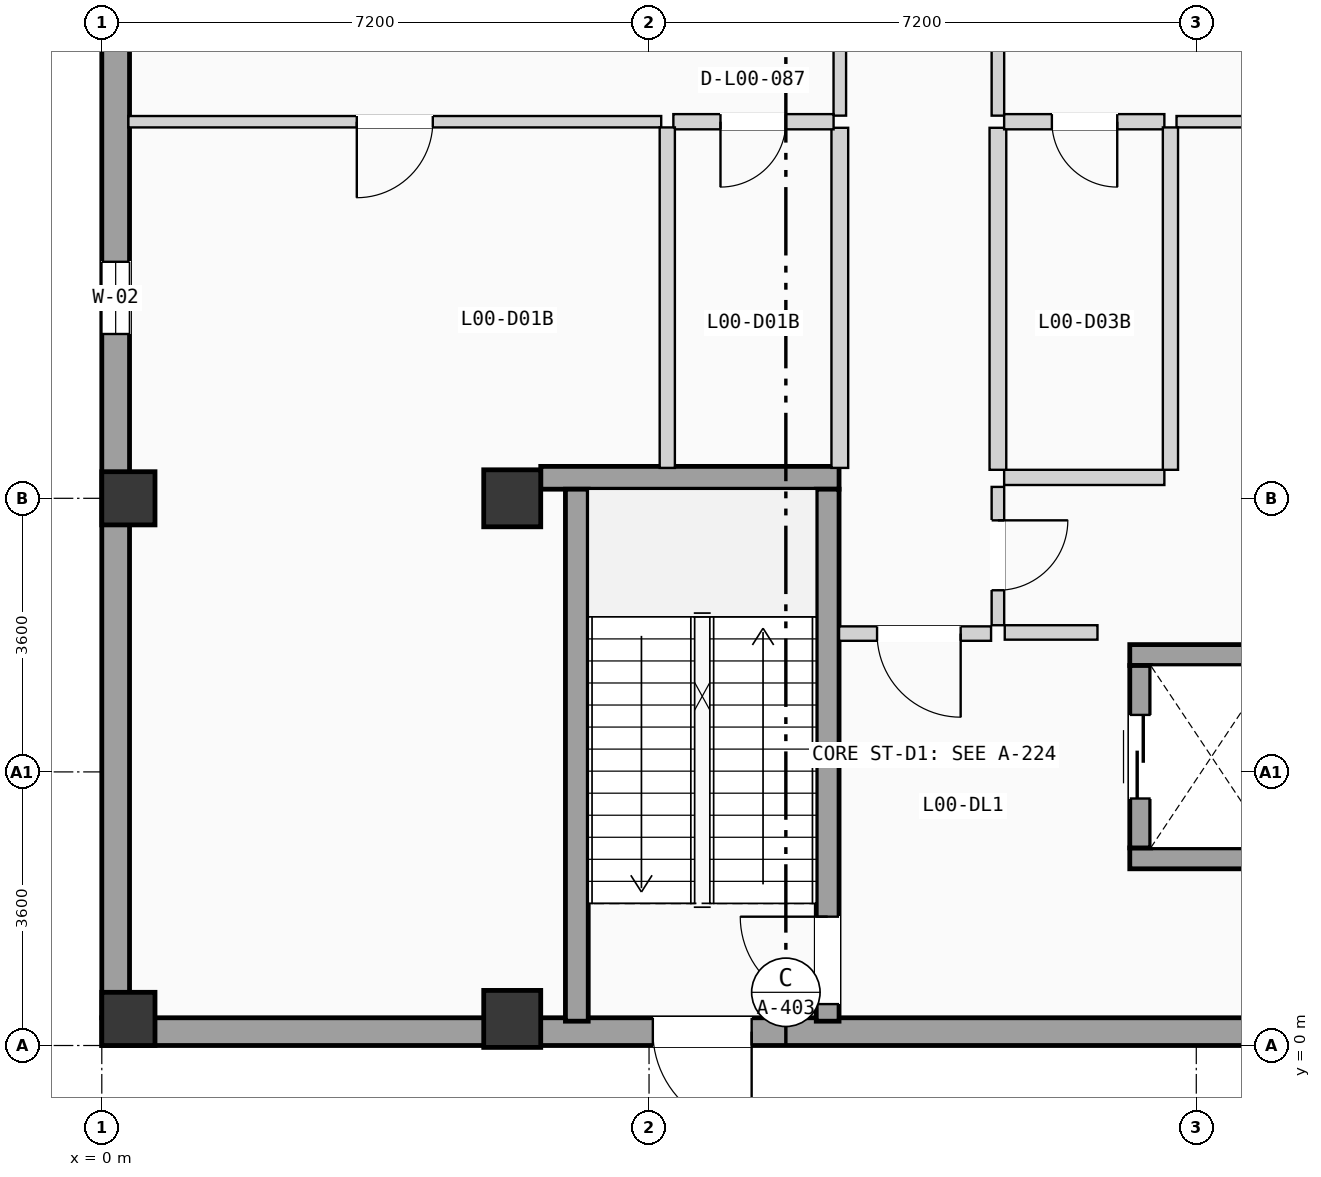
"""IFC4 building model, lengths in metres.
Left out: names, types, materials, properties, quantities, classifications, styles, units other than length and angle.
Written with IfcOpenShell. Run it as: python <this file> out.ifc"""

import sys

from ifc_helpers import new_model, si_unit, direction, frame, frame_2d, origin, origin_2d, place, context, subcontext, project, spatial, rectangle, extrude, element, fill, save


model = new_model("IFC4")
c1 = context("Model", 3, precision=1e-05, world=origin(), true_north=direction((0.0, 1.0)))
c2 = subcontext(c1, "Body", "Model", "MODEL_VIEW")
j1 = project(units=[si_unit("LENGTHUNIT", "METRE"), si_unit("PLANEANGLEUNIT", "RADIAN")], contexts=[c1])
p1 = place(None, origin())
s1 = spatial("IfcSite", under=j1, at=p1, CompositionType="ELEMENT")
p2 = place(p1, origin())
s2 = spatial("IfcBuilding", under=s1, at=p2, CompositionType="ELEMENT")
p3 = place(p2, origin())
s3 = spatial("IfcBuildingStorey", under=s2, at=p3, CompositionType="ELEMENT", Elevation=0.0)
for number, where, z_axis, x_axis in (
    (1, (0.35, 0.35, 0.0), (0.0, 0.0, 1.0), (1.0, 0.0, 0.0)),
    (2, (0.35, 7.2, 0.0), (0.0, 0.0, 1.0), (1.0, 0.0, 0.0)),
):
    element("IfcColumn", number, at=place(p3, frame(where, z_axis=z_axis, x_axis=x_axis)), inside=s3, PredefinedType="COLUMN", context=c2, shape_type="SweptSolid", body=[
        extrude(rectangle(XDim=0.7, YDim=0.7, at=origin_2d()), origin(), (0.0, 0.0, 1.0), 4.9),
    ])
for number, where, z_axis, x_axis in (
    (3, (5.4, 0.35, 0.0), (0.0, 0.0, 1.0), (1.0, 0.0, 0.0)),
    (4, (5.4, 7.2, 0.0), (0.0, 0.0, 1.0), (1.0, 0.0, 0.0)),
):
    element("IfcColumn", number, at=place(p3, frame(where, z_axis=z_axis, x_axis=x_axis)), inside=s3, PredefinedType="COLUMN", context=c2, shape_type="SweptSolid", body=[
        extrude(rectangle(XDim=0.75, YDim=0.75, at=origin_2d()), origin(), (0.0, 0.0, 1.0), 4.9),
    ])
p4 = place(p3, frame((0.0, 0.183, 0.0), z_axis=(0.0, 0.0, 1.0), x_axis=(1.0, 0.0, 0.0)))
e5 = element("IfcWall", 5, at=p4, inside=s3, PredefinedType="SOLIDWALL", context=c2, shape_type="SweptSolid", body=[
    extrude(rectangle(XDim=21.6, YDim=0.365, at=frame_2d((10.8, 0.0))), origin(), (0.0, 0.0, 1.0), 4.64),
])
p5 = place(p4, frame((7.25, 0.0, 0.0)))
e6 = element("IfcOpeningElement", 6, at=p5, cuts=e5, PredefinedType="OPENING", context=c2, shape_type="SweptSolid", body=[
    extrude(rectangle(XDim=1.3, YDim=2.2, at=frame_2d((0.65, 1.1))), frame((0.0, 0.192, 0.0), z_axis=(0.0, -1.0, 0.0), x_axis=(1.0, 0.0, 0.0)), (0.0, 0.0, 1.0), 0.385),
])
p6 = place(p3, frame((0.183, 0.365, 0.0), z_axis=(0.0, 0.0, 1.0), x_axis=(0.0, 1.0, 0.0)))
e7 = element("IfcWall", 7, at=p6, inside=s3, PredefinedType="SOLIDWALL", context=c2, shape_type="SweptSolid", body=[
    extrude(rectangle(XDim=49.67, YDim=0.365, at=frame_2d((24.835, 0.0))), origin(), (0.0, 0.0, 1.0), 4.64),
])
p7 = place(p6, frame((15.325, 0.0, 0.9)))
e8 = element("IfcOpeningElement", 8, at=p7, cuts=e7, PredefinedType="OPENING", context=c2, shape_type="SweptSolid", body=[
    extrude(rectangle(XDim=0.95, YDim=1.2, at=frame_2d((0.475, 0.6))), frame((0.0, 0.192, 0.0), z_axis=(0.0, -1.0, 0.0), x_axis=(1.0, 0.0, 0.0)), (0.0, 0.0, 1.0), 0.385),
])
p8 = place(p6, frame((8.997, 0.0, 0.9)))
e9 = element("IfcOpeningElement", 9, at=p8, cuts=e7, PredefinedType="OPENING", context=c2, shape_type="SweptSolid", body=[
    extrude(rectangle(XDim=0.95, YDim=1.35, at=frame_2d((0.475, 0.675))), frame((0.0, 0.192, 0.0), z_axis=(0.0, -1.0, 0.0), x_axis=(1.0, 0.0, 0.0)), (0.0, 0.0, 1.0), 0.385),
])
p9 = place(p6, frame((18.735, 0.0, 0.9)))
e10 = element("IfcOpeningElement", 10, at=p9, cuts=e7, PredefinedType="OPENING", context=c2, shape_type="SweptSolid", body=[
    extrude(rectangle(XDim=0.95, YDim=1.5, at=frame_2d((0.475, 0.75))), frame((0.0, 0.192, 0.0), z_axis=(0.0, -1.0, 0.0), x_axis=(1.0, 0.0, 0.0)), (0.0, 0.0, 1.0), 0.385),
])
p10 = place(p6, frame((31.56, 0.0, 0.9)))
e11 = element("IfcOpeningElement", 11, at=p10, cuts=e7, PredefinedType="OPENING", context=c2, shape_type="SweptSolid", body=[
    extrude(rectangle(XDim=0.95, YDim=1.65, at=frame_2d((0.475, 0.825))), frame((0.0, 0.192, 0.0), z_axis=(0.0, -1.0, 0.0), x_axis=(1.0, 0.0, 0.0)), (0.0, 0.0, 1.0), 0.385),
])
p11 = place(p6, frame((24.662, 0.0, 0.9)))
e12 = element("IfcOpeningElement", 12, at=p11, cuts=e7, PredefinedType="OPENING", context=c2, shape_type="SweptSolid", body=[
    extrude(rectangle(XDim=0.95, YDim=1.8, at=frame_2d((0.475, 0.9))), frame((0.0, 0.192, 0.0), z_axis=(0.0, -1.0, 0.0), x_axis=(1.0, 0.0, 0.0)), (0.0, 0.0, 1.0), 0.385),
])
p12 = place(p6, frame((38.645, 0.0, 0.9)))
e13 = element("IfcOpeningElement", 13, at=p12, cuts=e7, PredefinedType="OPENING", context=c2, shape_type="SweptSolid", body=[
    extrude(rectangle(XDim=1.05, YDim=1.2, at=frame_2d((0.525, 0.6))), frame((0.0, 0.192, 0.0), z_axis=(0.0, -1.0, 0.0), x_axis=(1.0, 0.0, 0.0)), (0.0, 0.0, 1.0), 0.385),
])
p13 = place(p3, frame((5.775, 7.47, 0.0), z_axis=(0.0, 0.0, 1.0), x_axis=(1.0, 0.0, 0.0)))
e14 = element("IfcWall", 14, at=p13, inside=s3, PredefinedType="SHEAR", context=c2, shape_type="SweptSolid", body=[
    extrude(rectangle(XDim=3.925, YDim=0.3, at=frame_2d((1.962, 0.0))), origin(), (0.0, 0.0, 1.0), 4.64),
])
p14 = place(p3, frame((6.25, 0.32, 0.0), z_axis=(0.0, 0.0, 1.0), x_axis=(0.0, 1.0, 0.0)))
e15 = element("IfcWall", 15, at=p14, inside=s3, PredefinedType="SHEAR", context=c2, shape_type="SweptSolid", body=[
    extrude(rectangle(XDim=7.0, YDim=0.3, at=frame_2d((3.5, 0.0))), origin(), (0.0, 0.0, 1.0), 4.64),
])
p15 = place(p3, frame((9.55, 0.32, 0.0), z_axis=(0.0, 0.0, 1.0), x_axis=(0.0, 1.0, 0.0)))
e16 = element("IfcWall", 16, at=p15, inside=s3, PredefinedType="SHEAR", context=c2, shape_type="SweptSolid", body=[
    extrude(rectangle(XDim=7.0, YDim=0.3, at=frame_2d((3.5, 0.0))), origin(), (0.0, 0.0, 1.0), 4.64),
])
p16 = place(p15, frame((0.225, 0.0, 0.0)))
e17 = element("IfcOpeningElement", 17, at=p16, cuts=e16, PredefinedType="OPENING", context=c2, shape_type="SweptSolid", body=[
    extrude(rectangle(XDim=1.15, YDim=2.12, at=frame_2d((0.575, 1.06))), frame((0.0, 0.16, 0.0), z_axis=(0.0, -1.0, 0.0), x_axis=(1.0, 0.0, 0.0)), (0.0, 0.0, 1.0), 0.32),
])
for number, where, z_axis, x_axis in (
    (18, (13.525, 2.462, 0.0), (0.0, 0.0, 1.0), (1.0, 0.0, 0.0)),
    (19, (13.525, 5.137, 0.0), (0.0, 0.0, 1.0), (1.0, 0.0, 0.0)),
):
    element("IfcWall", number, at=place(p3, frame(where, z_axis=z_axis, x_axis=x_axis)), inside=s3, PredefinedType="SHEAR", context=c2, shape_type="SweptSolid", body=[
        extrude(rectangle(XDim=2.15, YDim=0.275, at=frame_2d((1.075, 0.0))), origin(), (0.0, 0.0, 1.0), 4.64),
    ])
p17 = place(p3, frame((13.663, 2.6, 0.0), z_axis=(0.0, 0.0, 1.0), x_axis=(0.0, 1.0, 0.0)))
e20 = element("IfcWall", 20, at=p17, inside=s3, PredefinedType="SHEAR", context=c2, shape_type="SweptSolid", body=[
    extrude(rectangle(XDim=2.4, YDim=0.275, at=frame_2d((1.2, 0.0))), origin(), (0.0, 0.0, 1.0), 4.64),
])
p18 = place(p17, frame((0.65, 0.0, 0.0)))
e21 = element("IfcOpeningElement", 21, at=p18, cuts=e20, PredefinedType="OPENING", context=c2, shape_type="SweptSolid", body=[
    extrude(rectangle(XDim=1.1, YDim=2.15, at=frame_2d((0.55, 1.075))), frame((0.0, 0.147, 0.0), z_axis=(0.0, -1.0, 0.0), x_axis=(1.0, 0.0, 0.0)), (0.0, 0.0, 1.0), 0.295),
])
p19 = place(p3, frame((11.88, 5.435, 0.0), z_axis=(0.0, 0.0, 1.0), x_axis=(1.0, 0.0, 0.0)))
e22 = element("IfcWall", 22, at=p19, inside=s3, PredefinedType="PARTITIONING", context=c2, shape_type="SweptSolid", body=[
    extrude(rectangle(XDim=1.22, YDim=0.19, at=frame_2d((0.61, 0.0))), origin(), (0.0, 0.0, 1.0), 3.84),
])
p20 = place(p3, frame((9.7, 5.42, 0.0), z_axis=(0.0, 0.0, 1.0), x_axis=(1.0, 0.0, 0.0)))
e23 = element("IfcWall", 23, at=p20, inside=s3, PredefinedType="PARTITIONING", context=c2, shape_type="SweptSolid", body=[
    extrude(rectangle(XDim=2.0, YDim=0.19, at=frame_2d((1.0, 0.0))), origin(), (0.0, 0.0, 1.0), 3.84),
])
p21 = place(p20, frame((0.5, 0.0, 0.0)))
e24 = element("IfcOpeningElement", 24, at=p21, cuts=e23, PredefinedType="OPENING", context=c2, shape_type="SweptSolid", body=[
    extrude(rectangle(XDim=1.1, YDim=2.12, at=frame_2d((0.55, 1.06))), frame((0.0, 0.105, 0.0), z_axis=(0.0, -1.0, 0.0), x_axis=(1.0, 0.0, 0.0)), (0.0, 0.0, 1.0), 0.21),
])
p22 = place(p3, frame((11.79, 5.53, 0.0), z_axis=(0.0, 0.0, 1.0), x_axis=(0.0, 1.0, 0.0)))
e25 = element("IfcWall", 25, at=p22, inside=s3, PredefinedType="PARTITIONING", context=c2, shape_type="SweptSolid", body=[
    extrude(rectangle(XDim=1.82, YDim=0.165, at=frame_2d((0.91, 0.0))), origin(), (0.0, 0.0, 1.0), 3.84),
])
p23 = place(p22, frame((0.46, 0.0, 0.0)))
e26 = element("IfcOpeningElement", 26, at=p23, cuts=e25, PredefinedType="OPENING", context=c2, shape_type="SweptSolid", body=[
    extrude(rectangle(XDim=0.92, YDim=2.04, at=frame_2d((0.46, 1.02))), frame((0.0, 0.093, 0.0), z_axis=(0.0, -1.0, 0.0), x_axis=(1.0, 0.0, 0.0)), (0.0, 0.0, 1.0), 0.185),
])
p24 = place(p3, frame((11.872, 7.475, 0.0), z_axis=(0.0, 0.0, 1.0), x_axis=(1.0, 0.0, 0.0)))
e27 = element("IfcWall", 27, at=p24, inside=s3, PredefinedType="PLUMBINGWALL", context=c2, shape_type="SweptSolid", body=[
    extrude(rectangle(XDim=2.108, YDim=0.2, at=frame_2d((1.054, 0.0))), origin(), (0.0, 0.0, 1.0), 3.84),
])
p25 = place(p3, frame((9.71, 12.235, 0.0), z_axis=(0.0, 0.0, 1.0), x_axis=(0.0, 1.0, 0.0)))
e28 = element("IfcWall", 28, at=p25, inside=s3, PredefinedType="PARTITIONING", context=c2, shape_type="SweptSolid", body=[
    extrude(rectangle(XDim=5.424, YDim=0.165, at=frame_2d((2.712, 0.0))), origin(), (0.0, 0.0, 1.0), 3.84),
])
p26 = place(p25, frame((2.222, 0.0, 0.0)))
e29 = element("IfcOpeningElement", 29, at=p26, cuts=e28, PredefinedType="OPENING", context=c2, shape_type="SweptSolid", body=[
    extrude(rectangle(XDim=0.98, YDim=2.08, at=frame_2d((0.49, 1.04))), frame((0.0, 0.093, 0.0), z_axis=(0.0, -1.0, 0.0), x_axis=(1.0, 0.0, 0.0)), (0.0, 0.0, 1.0), 0.185),
])
p27 = place(p3, frame((9.71, 7.6, 0.0), z_axis=(0.0, 0.0, 1.0), x_axis=(0.0, 1.0, 0.0)))
e30 = element("IfcWall", 30, at=p27, inside=s3, PredefinedType="PLUMBINGWALL", context=c2, shape_type="SweptSolid", body=[
    extrude(rectangle(XDim=4.475, YDim=0.22, at=frame_2d((2.237, 0.0))), origin(), (0.0, 0.0, 1.0), 3.84),
])
p28 = place(p3, frame((11.79, 12.235, 0.0), z_axis=(0.0, 0.0, 1.0), x_axis=(0.0, 1.0, 0.0)))
e31 = element("IfcWall", 31, at=p28, inside=s3, PredefinedType="PARTITIONING", context=c2, shape_type="SweptSolid", body=[
    extrude(rectangle(XDim=5.424, YDim=0.165, at=frame_2d((2.712, 0.0))), origin(), (0.0, 0.0, 1.0), 3.84),
])
p29 = place(p28, frame((2.222, 0.0, 0.0)))
e32 = element("IfcOpeningElement", 32, at=p29, cuts=e31, PredefinedType="OPENING", context=c2, shape_type="SweptSolid", body=[
    extrude(rectangle(XDim=0.98, YDim=2.08, at=frame_2d((0.49, 1.04))), frame((0.0, 0.093, 0.0), z_axis=(0.0, -1.0, 0.0), x_axis=(1.0, 0.0, 0.0)), (0.0, 0.0, 1.0), 0.185),
])
p30 = place(p3, frame((11.79, 7.575, 0.0), z_axis=(0.0, 0.0, 1.0), x_axis=(0.0, 1.0, 0.0)))
e33 = element("IfcWall", 33, at=p30, inside=s3, PredefinedType="PLUMBINGWALL", context=c2, shape_type="SweptSolid", body=[
    extrude(rectangle(XDim=4.5, YDim=0.22, at=frame_2d((2.25, 0.0))), origin(), (0.0, 0.0, 1.0), 3.84),
])
p31 = place(p3, frame((7.52, 12.155, 0.0), z_axis=(0.0, 0.0, 1.0), x_axis=(1.0, 0.0, 0.0)))
e34 = element("IfcWall", 34, at=p31, inside=s3, PredefinedType="PLUMBINGWALL", context=c2, shape_type="SweptSolid", body=[
    extrude(rectangle(XDim=2.108, YDim=0.2, at=frame_2d((1.054, 0.0))), origin(), (0.0, 0.0, 1.0), 3.84),
])
p32 = place(p31, frame((0.62, 0.0, 0.0)))
e35 = element("IfcOpeningElement", 35, at=p32, cuts=e34, PredefinedType="OPENING", context=c2, shape_type="SweptSolid", body=[
    extrude(rectangle(XDim=0.86, YDim=2.0, at=frame_2d((0.43, 1.0))), frame((0.0, 0.11, 0.0), z_axis=(0.0, -1.0, 0.0), x_axis=(1.0, 0.0, 0.0)), (0.0, 0.0, 1.0), 0.22),
])
p33 = place(p3, frame((0.35, 12.155, 0.0), z_axis=(0.0, 0.0, 1.0), x_axis=(1.0, 0.0, 0.0)))
e36 = element("IfcWall", 36, at=p33, inside=s3, PredefinedType="PARTITIONING", context=c2, shape_type="SweptSolid", body=[
    extrude(rectangle(XDim=7.01, YDim=0.15, at=frame_2d((3.505, 0.0))), origin(), (0.0, 0.0, 1.0), 3.84),
])
p34 = place(p33, frame((3.005, 0.0, 0.0)))
e37 = element("IfcOpeningElement", 37, at=p34, cuts=e36, PredefinedType="OPENING", context=c2, shape_type="SweptSolid", body=[
    extrude(rectangle(XDim=1.0, YDim=2.06, at=frame_2d((0.5, 1.03))), frame((0.0, 0.085, 0.0), z_axis=(0.0, -1.0, 0.0), x_axis=(1.0, 0.0, 0.0)), (0.0, 0.0, 1.0), 0.17),
])
p35 = place(p3, frame((7.44, 7.6, 0.0), z_axis=(0.0, 0.0, 1.0), x_axis=(0.0, 1.0, 0.0)))
e38 = element("IfcWall", 38, at=p35, inside=s3, PredefinedType="PLUMBINGWALL", context=c2, shape_type="SweptSolid", body=[
    extrude(rectangle(XDim=4.48, YDim=0.2, at=frame_2d((2.24, 0.0))), origin(), (0.0, 0.0, 1.0), 3.84),
])
p36 = place(p3, frame((11.872, 12.155, 0.0), z_axis=(0.0, 0.0, 1.0), x_axis=(1.0, 0.0, 0.0)))
e39 = element("IfcWall", 39, at=p36, inside=s3, PredefinedType="PLUMBINGWALL", context=c2, shape_type="SweptSolid", body=[
    extrude(rectangle(XDim=2.108, YDim=0.2, at=frame_2d((1.054, 0.0))), origin(), (0.0, 0.0, 1.0), 3.84),
])
p37 = place(p36, frame((0.628, 0.0, 0.0)))
e40 = element("IfcOpeningElement", 40, at=p37, cuts=e39, PredefinedType="OPENING", context=c2, shape_type="SweptSolid", body=[
    extrude(rectangle(XDim=0.86, YDim=2.0, at=frame_2d((0.43, 1.0))), frame((0.0, 0.11, 0.0), z_axis=(0.0, -1.0, 0.0), x_axis=(1.0, 0.0, 0.0)), (0.0, 0.0, 1.0), 0.22),
])
p38 = place(p3, frame((14.14, 12.155, 0.0), z_axis=(0.0, 0.0, 1.0), x_axis=(1.0, 0.0, 0.0)))
e41 = element("IfcWall", 41, at=p38, inside=s3, PredefinedType="PARTITIONING", context=c2, shape_type="SweptSolid", body=[
    extrude(rectangle(XDim=7.11, YDim=0.15, at=frame_2d((3.555, 0.0))), origin(), (0.0, 0.0, 1.0), 3.84),
])
p39 = place(p38, frame((3.085, 0.0, 0.0)))
e42 = element("IfcOpeningElement", 42, at=p39, cuts=e41, PredefinedType="OPENING", context=c2, shape_type="SweptSolid", body=[
    extrude(rectangle(XDim=0.94, YDim=2.06, at=frame_2d((0.47, 1.03))), frame((0.0, 0.085, 0.0), z_axis=(0.0, -1.0, 0.0), x_axis=(1.0, 0.0, 0.0)), (0.0, 0.0, 1.0), 0.17),
])
p40 = place(p3, frame((14.06, 7.575, 0.0), z_axis=(0.0, 0.0, 1.0), x_axis=(0.0, 1.0, 0.0)))
e43 = element("IfcWall", 43, at=p40, inside=s3, PredefinedType="PLUMBINGWALL", context=c2, shape_type="SweptSolid", body=[
    extrude(rectangle(XDim=4.505, YDim=0.2, at=frame_2d((2.252, 0.0))), origin(), (0.0, 0.0, 1.0), 3.84),
])
p41 = place(p5, frame((1.3, 0.0, 0.0), z_axis=(0.0, 0.0, 1.0), x_axis=(-1.0, 0.0, 0.0)))
e44 = element("IfcDoor", 44, at=p41, inside=s3, OperationType="SINGLE_SWING_RIGHT", PredefinedType="DOOR", context=c2, shape_type="SweptSolid", body=[
    extrude(rectangle(XDim=1.3, YDim=2.2, at=frame_2d((0.65, 1.1))), frame((0.0, 0.025, 0.0), z_axis=(0.0, -1.0, 0.0), x_axis=(1.0, 0.0, 0.0)), (0.0, 0.0, 1.0), 0.05),
])
fill(e6, e44)
p42 = place(p8, origin())
e45 = element("IfcWindow", 45, at=p42, inside=s3, PartitioningType="SINGLE_PANEL", PredefinedType="WINDOW", context=c2, shape_type="SweptSolid", body=[
    extrude(rectangle(XDim=0.95, YDim=1.35, at=frame_2d((0.475, 0.675))), frame((0.0, 0.03, 0.0), z_axis=(0.0, -1.0, 0.0), x_axis=(1.0, 0.0, 0.0)), (0.0, 0.0, 1.0), 0.06),
])
fill(e9, e45)
p43 = place(p16, origin())
e46 = element("IfcDoor", 46, at=p43, inside=s3, OperationType="SINGLE_SWING_RIGHT", PredefinedType="DOOR", context=c2, shape_type="SweptSolid", body=[
    extrude(rectangle(XDim=1.15, YDim=2.12, at=frame_2d((0.575, 1.06))), frame((0.0, 0.025, 0.0), z_axis=(0.0, -1.0, 0.0), x_axis=(1.0, 0.0, 0.0)), (0.0, 0.0, 1.0), 0.05),
])
fill(e17, e46)
p44 = place(p18, origin())
e47 = element("IfcDoor", 47, at=p44, inside=s3, OperationType="SLIDING_TO_LEFT", PredefinedType="DOOR", context=c2, shape_type="SweptSolid", body=[
    extrude(rectangle(XDim=1.1, YDim=2.15, at=frame_2d((0.55, 1.075))), frame((0.0, 0.025, 0.0), z_axis=(0.0, -1.0, 0.0), x_axis=(1.0, 0.0, 0.0)), (0.0, 0.0, 1.0), 0.05),
])
fill(e21, e47)
p45 = place(p21, frame((1.1, 0.0, 0.0), z_axis=(0.0, 0.0, 1.0), x_axis=(-1.0, 0.0, 0.0)))
e48 = element("IfcDoor", 48, at=p45, inside=s3, OperationType="SINGLE_SWING_RIGHT", PredefinedType="DOOR", context=c2, shape_type="SweptSolid", body=[
    extrude(rectangle(XDim=1.1, YDim=2.12, at=frame_2d((0.55, 1.06))), frame((0.0, 0.025, 0.0), z_axis=(0.0, -1.0, 0.0), x_axis=(1.0, 0.0, 0.0)), (0.0, 0.0, 1.0), 0.05),
])
fill(e24, e48)
p46 = place(p23, frame((0.92, 0.0, 0.0), z_axis=(0.0, 0.0, 1.0), x_axis=(-1.0, 0.0, 0.0)))
e49 = element("IfcDoor", 49, at=p46, inside=s3, OperationType="SINGLE_SWING_RIGHT", PredefinedType="DOOR", context=c2, shape_type="SweptSolid", body=[
    extrude(rectangle(XDim=0.92, YDim=2.04, at=frame_2d((0.46, 1.02))), frame((0.0, 0.025, 0.0), z_axis=(0.0, -1.0, 0.0), x_axis=(1.0, 0.0, 0.0)), (0.0, 0.0, 1.0), 0.05),
])
fill(e26, e49)
p47 = place(p32, frame((0.86, 0.0, 0.0), z_axis=(0.0, 0.0, 1.0), x_axis=(-1.0, 0.0, 0.0)))
e50 = element("IfcDoor", 50, at=p47, inside=s3, OperationType="SINGLE_SWING_LEFT", PredefinedType="DOOR", context=c2, shape_type="SweptSolid", body=[
    extrude(rectangle(XDim=0.86, YDim=2.0, at=frame_2d((0.43, 1.0))), frame((0.0, 0.025, 0.0), z_axis=(0.0, -1.0, 0.0), x_axis=(1.0, 0.0, 0.0)), (0.0, 0.0, 1.0), 0.05),
])
fill(e35, e50)
p48 = place(p34, frame((1.0, 0.0, 0.0), z_axis=(0.0, 0.0, 1.0), x_axis=(-1.0, 0.0, 0.0)))
e51 = element("IfcDoor", 51, at=p48, inside=s3, OperationType="SINGLE_SWING_LEFT", PredefinedType="DOOR", context=c2, shape_type="SweptSolid", body=[
    extrude(rectangle(XDim=1.0, YDim=2.06, at=frame_2d((0.5, 1.03))), frame((0.0, 0.025, 0.0), z_axis=(0.0, -1.0, 0.0), x_axis=(1.0, 0.0, 0.0)), (0.0, 0.0, 1.0), 0.05),
])
fill(e37, e51)
p49 = place(p37, frame((0.86, 0.0, 0.0), z_axis=(0.0, 0.0, 1.0), x_axis=(-1.0, 0.0, 0.0)))
e52 = element("IfcDoor", 52, at=p49, inside=s3, OperationType="SINGLE_SWING_RIGHT", PredefinedType="DOOR", context=c2, shape_type="SweptSolid", body=[
    extrude(rectangle(XDim=0.86, YDim=2.0, at=frame_2d((0.43, 1.0))), frame((0.0, 0.025, 0.0), z_axis=(0.0, -1.0, 0.0), x_axis=(1.0, 0.0, 0.0)), (0.0, 0.0, 1.0), 0.05),
])
fill(e40, e52)
save(model, sys.argv[1])
